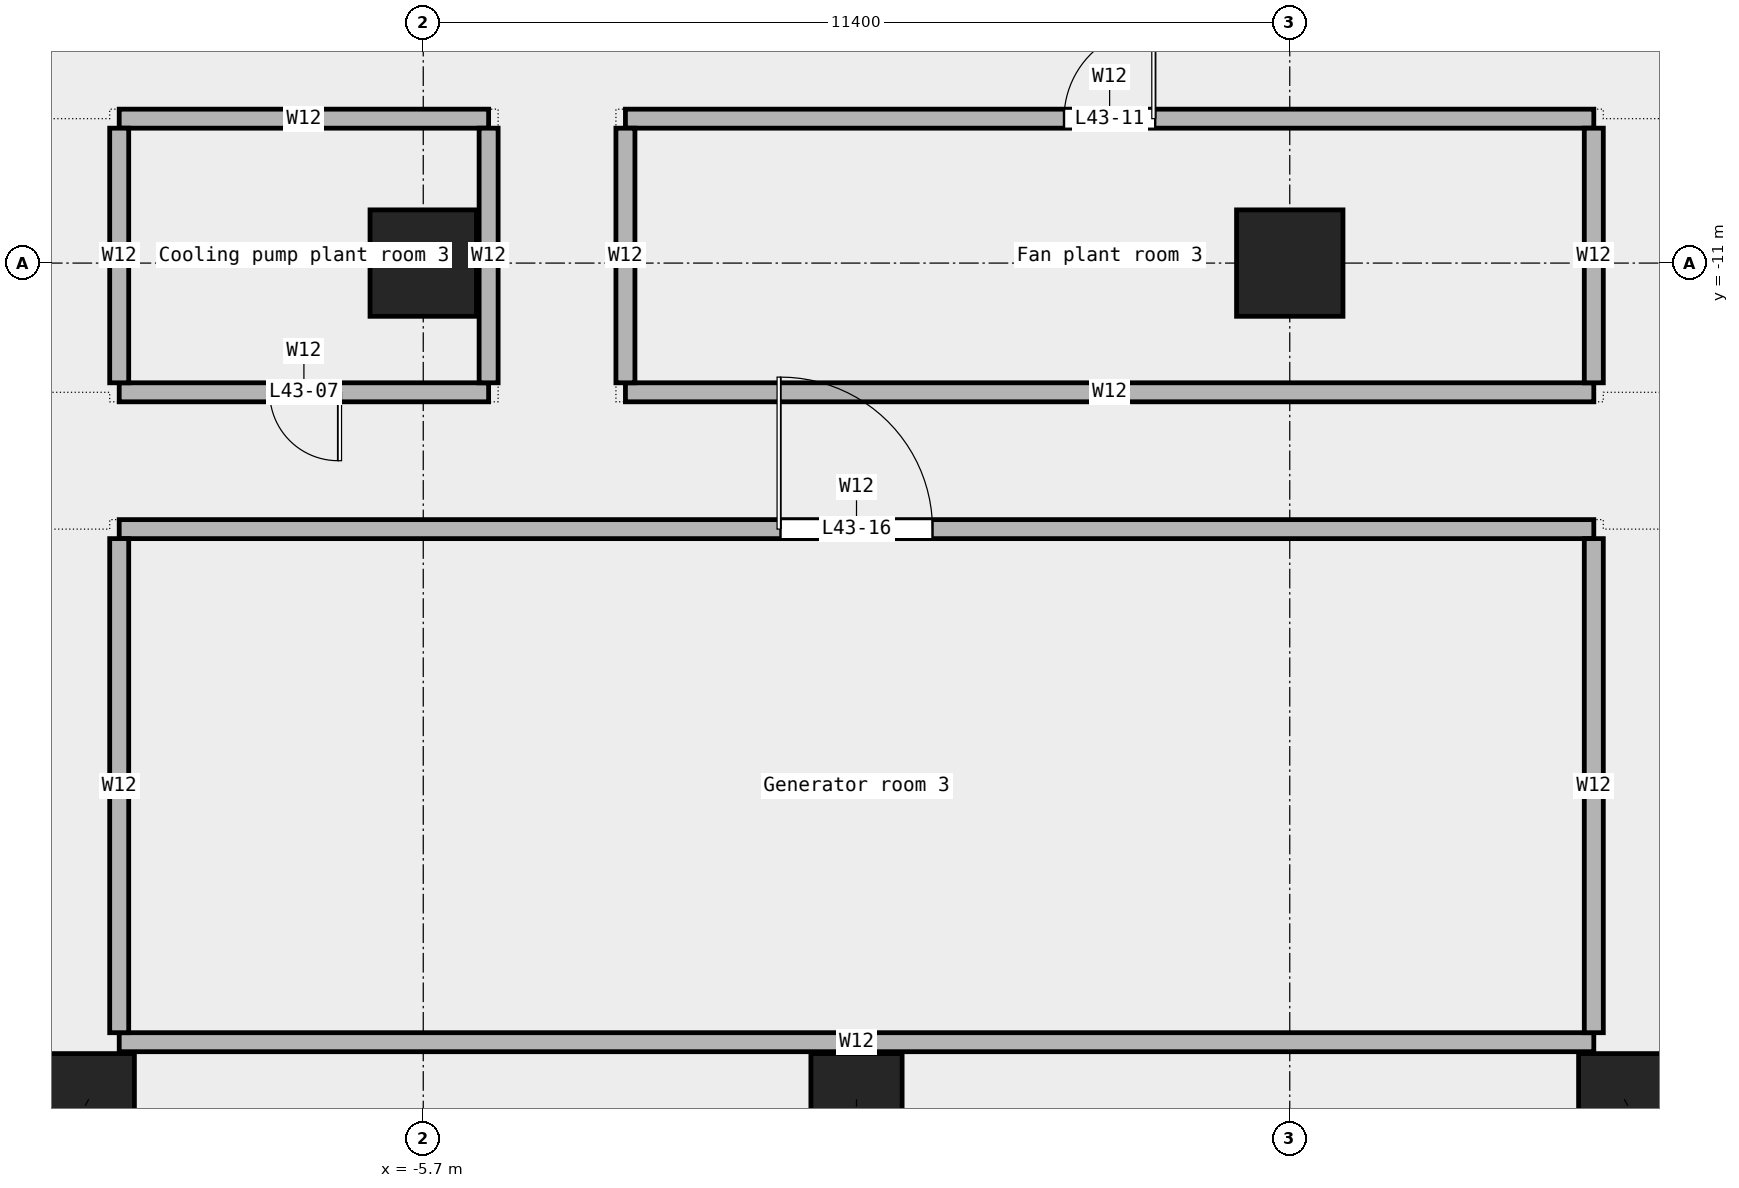
"""IFC4 building model, lengths in metres.
Left out: names, types, materials, properties, quantities, classifications, styles, units other than length and angle.
Written with IfcOpenShell. Run it as: python <this file> out.ifc"""

import sys

from ifc_helpers import new_model, si_unit, direction, frame, frame_2d, origin, origin_2d, place, context, subcontext, project, spatial, rectangle, extrude, element, fill, save


model = new_model("IFC4")
c1 = context("Model", 3, precision=1e-05, world=origin(), true_north=direction((0.0, 1.0)))
c2 = subcontext(c1, "Body", "Model", "MODEL_VIEW")
j1 = project(units=[si_unit("LENGTHUNIT", "METRE"), si_unit("PLANEANGLEUNIT", "RADIAN")], contexts=[c1])
p1 = place(None, origin())
s1 = spatial("IfcSite", under=j1, at=p1, CompositionType="ELEMENT")
p2 = place(p1, origin())
s2 = spatial("IfcBuilding", under=s1, at=p2, CompositionType="ELEMENT")
p3 = place(p2, frame((0.0, 0.0, 205.0)))
s3 = spatial("IfcBuildingStorey", under=s2, at=p3, CompositionType="ELEMENT", Elevation=205.0)
p4 = place(p3, frame((-10.1, -22.0, 0.0), z_axis=(-0.157990952402, -0.276473835095, 0.947945714409), x_axis=(0.868235155486, -0.496152914712, 0.0)))
e1 = element("IfcColumn", 1, at=p4, inside=s3, PredefinedType="COLUMN", context=c2, shape_type="SweptSolid", body=[
    extrude(rectangle(XDim=1.2, YDim=1.2, at=origin_2d()), origin(), (0.0, 0.0, 1.0), 5.908),
])
p5 = place(p3, frame((0.0, -22.0, 0.0), z_axis=(0.0, -0.279990357269, 0.960002812411), x_axis=(1.0, 0.0, 0.0)))
e2 = element("IfcColumn", 2, at=p5, inside=s3, PredefinedType="COLUMN", context=c2, shape_type="SweptSolid", body=[
    extrude(rectangle(XDim=1.2, YDim=1.2, at=origin_2d()), origin(), (0.0, 0.0, 1.0), 5.833),
])
p6 = place(p3, frame((10.1, -22.0, 0.0), z_axis=(0.157990952402, -0.276473835095, 0.947945714409), x_axis=(0.868235155486, 0.496152914712, 0.0)))
e3 = element("IfcColumn", 3, at=p6, inside=s3, PredefinedType="COLUMN", context=c2, shape_type="SweptSolid", body=[
    extrude(rectangle(XDim=1.2, YDim=1.2, at=origin_2d()), origin(), (0.0, 0.0, 1.0), 5.908),
])
for number, where, z_axis, x_axis in (
    (4, (-5.7, -11.0, 0.0), (0.0, 0.0, 1.0), (1.0, 0.0, 0.0)),
    (5, (5.7, -11.0, 0.0), (0.0, 0.0, 1.0), (1.0, 0.0, 0.0)),
):
    element("IfcColumn", number, at=place(p3, frame(where, z_axis=z_axis, x_axis=x_axis)), inside=s3, PredefinedType="COLUMN", context=c2, shape_type="SweptSolid", body=[
        extrude(rectangle(XDim=1.4, YDim=1.4, at=origin_2d()), origin(), (0.0, 0.0, 1.0), 5.6),
    ])
p7 = place(p3, frame((-9.7, -21.25, 0.0), z_axis=(0.0, 0.0, 1.0), x_axis=(1.0, 0.0, 0.0)))
e6 = element("IfcWall", 6, at=p7, inside=s3, PredefinedType="PARTITIONING", context=c2, shape_type="SweptSolid", body=[
    extrude(rectangle(XDim=19.4, YDim=0.25, at=frame_2d((9.7, 0.0))), origin(), (0.0, 0.0, 1.0), 5.6),
])
p8 = place(p3, frame((-9.7, -14.5, 0.0), z_axis=(0.0, 0.0, 1.0), x_axis=(1.0, 0.0, 0.0)))
e7 = element("IfcWall", 7, at=p8, inside=s3, PredefinedType="PARTITIONING", context=c2, shape_type="SweptSolid", body=[
    extrude(rectangle(XDim=19.4, YDim=0.25, at=frame_2d((9.7, 0.0))), origin(), (0.0, 0.0, 1.0), 5.6),
])
p9 = place(p8, frame((8.7, 0.0, 0.0)))
e8 = element("IfcOpeningElement", 8, at=p9, cuts=e7, PredefinedType="OPENING", context=c2, shape_type="SweptSolid", body=[
    extrude(rectangle(XDim=2.0, YDim=2.1, at=frame_2d((1.0, 1.05))), frame((0.0, 0.137, 0.0), z_axis=(0.0, -1.0, 0.0), x_axis=(1.0, 0.0, 0.0)), (0.0, 0.0, 1.0), 0.274),
])
p10 = place(p3, frame((-9.7, -12.7, 0.0), z_axis=(0.0, 0.0, 1.0), x_axis=(1.0, 0.0, 0.0)))
e9 = element("IfcWall", 9, at=p10, inside=s3, PredefinedType="PARTITIONING", context=c2, shape_type="SweptSolid", body=[
    extrude(rectangle(XDim=4.86, YDim=0.25, at=frame_2d((2.43, 0.0))), origin(), (0.0, 0.0, 1.0), 5.6),
])
p11 = place(p10, frame((1.98, 0.0, 0.0)))
e10 = element("IfcOpeningElement", 10, at=p11, cuts=e9, PredefinedType="OPENING", context=c2, shape_type="SweptSolid", body=[
    extrude(rectangle(XDim=0.9, YDim=2.1, at=frame_2d((0.45, 1.05))), frame((0.0, 0.137, 0.0), z_axis=(0.0, -1.0, 0.0), x_axis=(1.0, 0.0, 0.0)), (0.0, 0.0, 1.0), 0.274),
])
p12 = place(p3, frame((-3.04, -12.7, 0.0), z_axis=(0.0, 0.0, 1.0), x_axis=(1.0, 0.0, 0.0)))
e11 = element("IfcWall", 11, at=p12, inside=s3, PredefinedType="PARTITIONING", context=c2, shape_type="SweptSolid", body=[
    extrude(rectangle(XDim=12.74, YDim=0.25, at=frame_2d((6.37, 0.0))), origin(), (0.0, 0.0, 1.0), 5.6),
])
p13 = place(p3, frame((-9.7, -9.1, 0.0), z_axis=(0.0, 0.0, 1.0), x_axis=(1.0, 0.0, 0.0)))
e12 = element("IfcWall", 12, at=p13, inside=s3, PredefinedType="PARTITIONING", context=c2, shape_type="SweptSolid", body=[
    extrude(rectangle(XDim=4.86, YDim=0.25, at=frame_2d((2.43, 0.0))), origin(), (0.0, 0.0, 1.0), 5.6),
])
p14 = place(p3, frame((-3.04, -9.1, 0.0), z_axis=(0.0, 0.0, 1.0), x_axis=(1.0, 0.0, 0.0)))
e13 = element("IfcWall", 13, at=p14, inside=s3, PredefinedType="PARTITIONING", context=c2, shape_type="SweptSolid", body=[
    extrude(rectangle(XDim=12.74, YDim=0.25, at=frame_2d((6.37, 0.0))), origin(), (0.0, 0.0, 1.0), 5.6),
])
p15 = place(p14, frame((5.77, 0.0, 0.0)))
e14 = element("IfcOpeningElement", 14, at=p15, cuts=e13, PredefinedType="OPENING", context=c2, shape_type="SweptSolid", body=[
    extrude(rectangle(XDim=1.2, YDim=2.1, at=frame_2d((0.6, 1.05))), frame((0.0, 0.137, 0.0), z_axis=(0.0, -1.0, 0.0), x_axis=(1.0, 0.0, 0.0)), (0.0, 0.0, 1.0), 0.274),
])
p16 = place(p3, frame((-9.7, -21.125, 0.0), z_axis=(0.0, 0.0, 1.0), x_axis=(0.0, 1.0, 0.0)))
e15 = element("IfcWall", 15, at=p16, inside=s3, PredefinedType="PARTITIONING", context=c2, shape_type="SweptSolid", body=[
    extrude(rectangle(XDim=6.5, YDim=0.25, at=frame_2d((3.25, 0.0))), origin(), (0.0, 0.0, 1.0), 5.6),
])
for number, where, z_axis, x_axis in (
    (16, (-9.7, -12.575, 0.0), (0.0, 0.0, 1.0), (0.0, 1.0, 0.0)),
    (17, (-4.84, -12.575, 0.0), (0.0, 0.0, 1.0), (0.0, 1.0, 0.0)),
    (18, (-3.04, -12.575, 0.0), (0.0, 0.0, 1.0), (0.0, 1.0, 0.0)),
):
    element("IfcWall", number, at=place(p3, frame(where, z_axis=z_axis, x_axis=x_axis)), inside=s3, PredefinedType="PARTITIONING", context=c2, shape_type="SweptSolid", body=[
        extrude(rectangle(XDim=3.35, YDim=0.25, at=frame_2d((1.675, 0.0))), origin(), (0.0, 0.0, 1.0), 5.6),
    ])
p17 = place(p3, frame((9.7, -21.125, 0.0), z_axis=(0.0, 0.0, 1.0), x_axis=(0.0, 1.0, 0.0)))
e19 = element("IfcWall", 19, at=p17, inside=s3, PredefinedType="PARTITIONING", context=c2, shape_type="SweptSolid", body=[
    extrude(rectangle(XDim=6.5, YDim=0.25, at=frame_2d((3.25, 0.0))), origin(), (0.0, 0.0, 1.0), 5.6),
])
p18 = place(p3, frame((9.7, -12.575, 0.0), z_axis=(0.0, 0.0, 1.0), x_axis=(0.0, 1.0, 0.0)))
e20 = element("IfcWall", 20, at=p18, inside=s3, PredefinedType="PARTITIONING", context=c2, shape_type="SweptSolid", body=[
    extrude(rectangle(XDim=3.35, YDim=0.25, at=frame_2d((1.675, 0.0))), origin(), (0.0, 0.0, 1.0), 5.6),
])
p19 = place(p11, origin())
e21 = element("IfcDoor", 21, at=p19, inside=s3, OperationType="SINGLE_SWING_LEFT", PredefinedType="DOOR", context=c2, shape_type="SweptSolid", body=[
    extrude(rectangle(XDim=0.9, YDim=2.1, at=frame_2d((0.45, 1.05))), frame((0.0, 0.025, 0.0), z_axis=(0.0, -1.0, 0.0), x_axis=(1.0, 0.0, 0.0)), (0.0, 0.0, 1.0), 0.05),
])
fill(e10, e21)
p20 = place(p15, origin())
e22 = element("IfcDoor", 22, at=p20, inside=s3, OperationType="SINGLE_SWING_RIGHT", PredefinedType="DOOR", context=c2, shape_type="SweptSolid", body=[
    extrude(rectangle(XDim=1.2, YDim=2.1, at=frame_2d((0.6, 1.05))), frame((0.0, 0.025, 0.0), z_axis=(0.0, -1.0, 0.0), x_axis=(1.0, 0.0, 0.0)), (0.0, 0.0, 1.0), 0.05),
])
fill(e14, e22)
p21 = place(p9, origin())
e23 = element("IfcDoor", 23, at=p21, inside=s3, OperationType="DOUBLE_DOOR_SINGLE_SWING", PredefinedType="DOOR", context=c2, shape_type="SweptSolid", body=[
    extrude(rectangle(XDim=2.0, YDim=2.1, at=frame_2d((1.0, 1.05))), frame((0.0, 0.025, 0.0), z_axis=(0.0, -1.0, 0.0), x_axis=(1.0, 0.0, 0.0)), (0.0, 0.0, 1.0), 0.05),
])
fill(e8, e23)
save(model, sys.argv[1])
